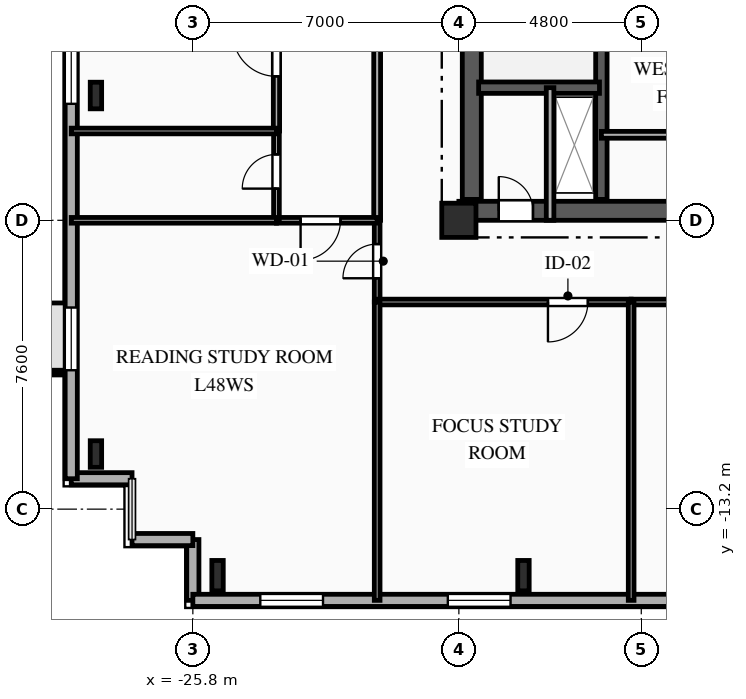
"""IFC4 building model, lengths in metres.
Left out: names, types, materials, properties, quantities, classifications, styles, units other than length and angle.
Written with IfcOpenShell. Run it as: python <this file> out.ifc"""

import sys

from ifc_helpers import new_model, si_unit, direction, frame, frame_2d, origin, origin_2d, place, context, subcontext, project, spatial, rectangle, i_section, extrude, element, fill, save


model = new_model("IFC4")
c1 = context("Model", 3, precision=1e-05, world=origin(), true_north=direction((0.0, 1.0)))
c2 = subcontext(c1, "Body", "Model", "MODEL_VIEW")
j1 = project(units=[si_unit("LENGTHUNIT", "METRE"), si_unit("PLANEANGLEUNIT", "RADIAN")], contexts=[c1])
p1 = place(None, origin())
s1 = spatial("IfcSite", under=j1, at=p1, CompositionType="ELEMENT")
p2 = place(p1, origin())
s2 = spatial("IfcBuilding", under=s1, at=p2, CompositionType="ELEMENT")
p3 = place(p2, frame((0.0, 0.0, 171.2)))
s3 = spatial("IfcBuildingStorey", under=s2, at=p3, CompositionType="ELEMENT", Elevation=171.2)
p4 = place(p3, frame((-18.8, -5.6, 0.0), z_axis=(0.0, 0.0, 1.0), x_axis=(1.0, 0.0, 0.0)))
e1 = element("IfcColumn", 1, at=p4, inside=s3, PredefinedType="COLUMN", context=c2, shape_type="SweptSolid", body=[
    extrude(rectangle(XDim=0.9, YDim=0.9, at=origin_2d()), origin(), (0.0, 0.0, 1.0), 3.35),
])
for number, where, z_axis, x_axis in (
    (2, (-25.15, -14.95, 0.0), (0.0, 0.0, 1.0), (1.0, 0.0, 0.0)),
    (3, (-17.1, -14.95, 0.0), (0.0, 0.0, 1.0), (1.0, 0.0, 0.0)),
):
    element("IfcColumn", number, at=place(p3, frame(where, z_axis=z_axis, x_axis=x_axis)), inside=s3, PredefinedType="COLUMN", context=c2, shape_type="SweptSolid", body=[
        extrude(i_section(OverallWidth=0.3, OverallDepth=0.8, WebThickness=0.018, FlangeThickness=0.033, FilletRadius=0.03, at=origin_2d()), origin(), (0.0, 0.0, 1.0), 3.35),
    ])
for number, where, z_axis, x_axis in (
    (4, (-28.35, -2.317, 0.0), (0.0, 0.0, 1.0), (1.0, 0.0, 0.0)),
    (5, (-28.35, -11.75, 0.0), (0.0, 0.0, 1.0), (1.0, 0.0, 0.0)),
):
    element("IfcColumn", number, at=place(p3, frame(where, z_axis=z_axis, x_axis=x_axis)), inside=s3, PredefinedType="COLUMN", context=c2, shape_type="SweptSolid", body=[
        extrude(i_section(OverallWidth=0.3, OverallDepth=0.7, WebThickness=0.017, FlangeThickness=0.032, FilletRadius=0.027, at=origin_2d()), origin(), (0.0, 0.0, 1.0), 3.35),
    ])
p5 = place(p3, frame((-25.8, -15.6, 0.0), z_axis=(0.0, 0.0, 1.0), x_axis=(0.0, 1.0, 0.0)))
e6 = element("IfcWall", 6, at=p5, inside=s3, PredefinedType="SOLIDWALL", context=c2, shape_type="SweptSolid", body=[
    extrude(rectangle(XDim=1.6, YDim=0.32, at=frame_2d((0.8, 0.0))), origin(), (0.0, 0.0, 1.0), 3.0),
])
p6 = place(p3, frame((-25.8, -14.0, 0.0), z_axis=(0.0, 0.0, 1.0), x_axis=(-1.0, 0.0, 0.0)))
e7 = element("IfcWall", 7, at=p6, inside=s3, PredefinedType="SOLIDWALL", context=c2, shape_type="SweptSolid", body=[
    extrude(rectangle(XDim=1.6, YDim=0.32, at=frame_2d((0.8, 0.0))), origin(), (0.0, 0.0, 1.0), 3.0),
])
p7 = place(p3, frame((-27.4, -12.4, 0.0), z_axis=(0.0, 0.0, 1.0), x_axis=(-1.0, 0.0, 0.0)))
e8 = element("IfcWall", 8, at=p7, inside=s3, PredefinedType="SOLIDWALL", context=c2, shape_type="SweptSolid", body=[
    extrude(rectangle(XDim=1.6, YDim=0.32, at=frame_2d((0.8, 0.0))), origin(), (0.0, 0.0, 1.0), 3.0),
])
p8 = place(p3, frame((-29.0, -12.4, 0.0), z_axis=(0.0, 0.0, 1.0), x_axis=(0.0, 1.0, 0.0)))
e9 = element("IfcWall", 9, at=p8, inside=s3, PredefinedType="SOLIDWALL", context=c2, shape_type="SweptSolid", body=[
    extrude(rectangle(XDim=29.6, YDim=0.32, at=frame_2d((14.8, 0.0))), origin(), (0.0, 0.0, 1.0), 3.0),
])
p9 = place(p8, frame((2.855, 0.0, 0.85)))
e10 = element("IfcOpeningElement", 10, at=p9, cuts=e9, PredefinedType="OPENING", context=c2, shape_type="SweptSolid", body=[
    extrude(rectangle(XDim=1.65, YDim=1.85, at=frame_2d((0.825, 0.925))), frame((0.0, 0.17, 0.0), z_axis=(0.0, -1.0, 0.0), x_axis=(1.0, 0.0, 0.0)), (0.0, 0.0, 1.0), 0.34),
])
p10 = place(p8, frame((9.865, 0.0, 0.85)))
e11 = element("IfcOpeningElement", 11, at=p10, cuts=e9, PredefinedType="OPENING", context=c2, shape_type="SweptSolid", body=[
    extrude(rectangle(XDim=1.95, YDim=1.85, at=frame_2d((0.975, 0.925))), frame((0.0, 0.17, 0.0), z_axis=(0.0, -1.0, 0.0), x_axis=(1.0, 0.0, 0.0)), (0.0, 0.0, 1.0), 0.34),
])
p11 = place(p8, frame((13.13, 0.0, 0.85)))
e12 = element("IfcOpeningElement", 12, at=p11, cuts=e9, PredefinedType="OPENING", context=c2, shape_type="SweptSolid", body=[
    extrude(rectangle(XDim=1.5, YDim=1.85, at=frame_2d((0.75, 0.925))), frame((0.0, 0.17, 0.0), z_axis=(0.0, -1.0, 0.0), x_axis=(1.0, 0.0, 0.0)), (0.0, 0.0, 1.0), 0.34),
])
p12 = place(p8, frame((15.93, 0.0, 0.85)))
e13 = element("IfcOpeningElement", 13, at=p12, cuts=e9, PredefinedType="OPENING", context=c2, shape_type="SweptSolid", body=[
    extrude(rectangle(XDim=1.5, YDim=1.85, at=frame_2d((0.75, 0.925))), frame((0.0, 0.17, 0.0), z_axis=(0.0, -1.0, 0.0), x_axis=(1.0, 0.0, 0.0)), (0.0, 0.0, 1.0), 0.34),
])
p13 = place(p8, frame((18.77, 0.0, 0.85)))
e14 = element("IfcOpeningElement", 14, at=p13, cuts=e9, PredefinedType="OPENING", context=c2, shape_type="SweptSolid", body=[
    extrude(rectangle(XDim=1.5, YDim=1.85, at=frame_2d((0.75, 0.925))), frame((0.0, 0.17, 0.0), z_axis=(0.0, -1.0, 0.0), x_axis=(1.0, 0.0, 0.0)), (0.0, 0.0, 1.0), 0.34),
])
p14 = place(p8, frame((24.255, 0.0, 0.85)))
e15 = element("IfcOpeningElement", 15, at=p14, cuts=e9, PredefinedType="OPENING", context=c2, shape_type="SweptSolid", body=[
    extrude(rectangle(XDim=1.65, YDim=1.85, at=frame_2d((0.825, 0.925))), frame((0.0, 0.17, 0.0), z_axis=(0.0, -1.0, 0.0), x_axis=(1.0, 0.0, 0.0)), (0.0, 0.0, 1.0), 0.34),
])
p15 = place(p3, frame((23.8, -15.6, 0.0), z_axis=(0.0, 0.0, 1.0), x_axis=(-1.0, 0.0, 0.0)))
e16 = element("IfcWall", 16, at=p15, inside=s3, PredefinedType="SOLIDWALL", context=c2, shape_type="SweptSolid", body=[
    extrude(rectangle(XDim=49.6, YDim=0.32, at=frame_2d((24.8, 0.0))), origin(), (0.0, 0.0, 1.0), 3.0),
])
p16 = place(p15, frame((1.13, 0.0, 0.85)))
e17 = element("IfcOpeningElement", 17, at=p16, cuts=e16, PredefinedType="OPENING", context=c2, shape_type="SweptSolid", body=[
    extrude(rectangle(XDim=1.1, YDim=1.85, at=frame_2d((0.55, 0.925))), frame((0.0, 0.17, 0.0), z_axis=(0.0, -1.0, 0.0), x_axis=(1.0, 0.0, 0.0)), (0.0, 0.0, 1.0), 0.34),
])
p17 = place(p15, frame((5.695, 0.0, 0.85)))
e18 = element("IfcOpeningElement", 18, at=p17, cuts=e16, PredefinedType="OPENING", context=c2, shape_type="SweptSolid", body=[
    extrude(rectangle(XDim=1.65, YDim=1.85, at=frame_2d((0.825, 0.925))), frame((0.0, 0.17, 0.0), z_axis=(0.0, -1.0, 0.0), x_axis=(1.0, 0.0, 0.0)), (0.0, 0.0, 1.0), 0.34),
])
p18 = place(p15, frame((12.975, 0.0, 0.85)))
e19 = element("IfcOpeningElement", 19, at=p18, cuts=e16, PredefinedType="OPENING", context=c2, shape_type="SweptSolid", body=[
    extrude(rectangle(XDim=1.65, YDim=1.85, at=frame_2d((0.825, 0.925))), frame((0.0, 0.17, 0.0), z_axis=(0.0, -1.0, 0.0), x_axis=(1.0, 0.0, 0.0)), (0.0, 0.0, 1.0), 0.34),
])
p19 = place(p15, frame((21.636, 0.0, 0.85)))
e20 = element("IfcOpeningElement", 20, at=p19, cuts=e16, PredefinedType="OPENING", context=c2, shape_type="SweptSolid", body=[
    extrude(rectangle(XDim=2.2, YDim=1.85, at=frame_2d((1.1, 0.925))), frame((0.0, 0.17, 0.0), z_axis=(0.0, -1.0, 0.0), x_axis=(1.0, 0.0, 0.0)), (0.0, 0.0, 1.0), 0.34),
])
p20 = place(p15, frame((33.935, 0.0, 0.85)))
e21 = element("IfcOpeningElement", 21, at=p20, cuts=e16, PredefinedType="OPENING", context=c2, shape_type="SweptSolid", body=[
    extrude(rectangle(XDim=1.65, YDim=1.85, at=frame_2d((0.825, 0.925))), frame((0.0, 0.17, 0.0), z_axis=(0.0, -1.0, 0.0), x_axis=(1.0, 0.0, 0.0)), (0.0, 0.0, 1.0), 0.34),
])
p21 = place(p15, frame((41.24, 0.0, 0.85)))
e22 = element("IfcOpeningElement", 22, at=p21, cuts=e16, PredefinedType="OPENING", context=c2, shape_type="SweptSolid", body=[
    extrude(rectangle(XDim=1.65, YDim=1.85, at=frame_2d((0.825, 0.925))), frame((0.0, 0.17, 0.0), z_axis=(0.0, -1.0, 0.0), x_axis=(1.0, 0.0, 0.0)), (0.0, 0.0, 1.0), 0.34),
])
p22 = place(p15, frame((46.175, 0.0, 0.85)))
e23 = element("IfcOpeningElement", 23, at=p22, cuts=e16, PredefinedType="OPENING", context=c2, shape_type="SweptSolid", body=[
    extrude(rectangle(XDim=1.65, YDim=1.85, at=frame_2d((0.825, 0.925))), frame((0.0, 0.17, 0.0), z_axis=(0.0, -1.0, 0.0), x_axis=(1.0, 0.0, 0.0)), (0.0, 0.0, 1.0), 0.34),
])
p23 = place(p3, frame((-18.8, -5.35, 0.0), z_axis=(0.0, 0.0, 1.0), x_axis=(1.0, 0.0, 0.0)))
e24 = element("IfcWall", 24, at=p23, inside=s3, PredefinedType="SHEAR", context=c2, shape_type="SweptSolid", body=[
    extrude(rectangle(XDim=9.6, YDim=0.5, at=frame_2d((4.8, 0.0))), origin(), (0.0, 0.0, 1.0), 3.0),
])
p24 = place(p23, frame((1.05, 0.0, 0.0)))
e25 = element("IfcOpeningElement", 25, at=p24, cuts=e24, PredefinedType="OPENING", context=c2, shape_type="SweptSolid", body=[
    extrude(rectangle(XDim=0.9, YDim=2.1, at=frame_2d((0.45, 1.05))), frame((0.0, 0.26, 0.0), z_axis=(0.0, -1.0, 0.0), x_axis=(1.0, 0.0, 0.0)), (0.0, 0.0, 1.0), 0.52),
])
p25 = place(p3, frame((-18.46, -5.05, 0.0), z_axis=(0.0, 0.0, 1.0), x_axis=(0.0, 1.0, 0.0)))
e26 = element("IfcWall", 26, at=p25, inside=s3, PredefinedType="SHEAR", context=c2, shape_type="SweptSolid", body=[
    extrude(rectangle(XDim=10.1, YDim=0.5, at=frame_2d((5.05, 0.0))), origin(), (0.0, 0.0, 1.0), 3.0),
])
p26 = place(p3, frame((-15.05, -5.05, 0.0), z_axis=(0.0, 0.0, 1.0), x_axis=(0.0, 1.0, 0.0)))
e27 = element("IfcWall", 27, at=p26, inside=s3, PredefinedType="SHEAR", context=c2, shape_type="SweptSolid", body=[
    extrude(rectangle(XDim=10.1, YDim=0.3, at=frame_2d((5.05, 0.0))), origin(), (0.0, 0.0, 1.0), 3.0),
])
p27 = place(p3, frame((-18.28, -2.11, 0.0), z_axis=(0.0, 0.0, 1.0), x_axis=(1.0, 0.0, 0.0)))
e28 = element("IfcWall", 28, at=p27, inside=s3, PredefinedType="SHEAR", context=c2, shape_type="SweptSolid", body=[
    extrude(rectangle(XDim=3.18, YDim=0.3, at=frame_2d((1.59, 0.0))), origin(), (0.0, 0.0, 1.0), 3.0),
])
p28 = place(p3, frame((-16.4, -5.6, 0.0), z_axis=(0.0, 0.0, 1.0), x_axis=(0.0, 1.0, 0.0)))
e29 = element("IfcWall", 29, at=p28, inside=s3, PredefinedType="PARTITIONING", context=c2, shape_type="SweptSolid", body=[
    extrude(rectangle(XDim=3.49, YDim=0.2, at=frame_2d((1.745, 0.0))), origin(), (0.0, 0.0, 1.0), 3.0),
])
p29 = place(p3, frame((-15.05, -3.35, 0.0), z_axis=(0.0, 0.0, 1.0), x_axis=(1.0, 0.0, 0.0)))
e30 = element("IfcWall", 30, at=p29, inside=s3, PredefinedType="PARTITIONING", context=c2, shape_type="SweptSolid", body=[
    extrude(rectangle(XDim=5.85, YDim=0.18, at=frame_2d((2.925, 0.0))), origin(), (0.0, 0.0, 1.0), 2.715),
])
p30 = place(p3, frame((-20.95, -7.75, 0.0), z_axis=(0.0, 0.0, 1.0), x_axis=(0.0, 1.0, 0.0)))
e31 = element("IfcWall", 31, at=p30, inside=s3, PredefinedType="PARTITIONING", context=c2, shape_type="SweptSolid", body=[
    extrude(rectangle(XDim=2.15, YDim=0.15, at=frame_2d((1.075, 0.0))), origin(), (0.0, 0.0, 1.0), 3.0),
])
p31 = place(p30, frame((0.625, 0.0, 0.0)))
e32 = element("IfcOpeningElement", 32, at=p31, cuts=e31, PredefinedType="OPENING", context=c2, shape_type="SweptSolid", body=[
    extrude(rectangle(XDim=0.9, YDim=2.1, at=frame_2d((0.45, 1.05))), frame((0.0, 0.085, 0.0), z_axis=(0.0, -1.0, 0.0), x_axis=(1.0, 0.0, 0.0)), (0.0, 0.0, 1.0), 0.17),
])
p32 = place(p3, frame((-14.267, -7.75, 0.0), z_axis=(0.0, 0.0, 1.0), x_axis=(-1.0, 0.0, 0.0)))
e33 = element("IfcWall", 33, at=p32, inside=s3, PredefinedType="PARTITIONING", context=c2, shape_type="SweptSolid", body=[
    extrude(rectangle(XDim=6.683, YDim=0.15, at=frame_2d((3.342, 0.0))), origin(), (0.0, 0.0, 1.0), 3.0),
])
p33 = place(p32, frame((1.139, 0.0, 0.0)))
e34 = element("IfcOpeningElement", 34, at=p33, cuts=e33, PredefinedType="OPENING", context=c2, shape_type="SweptSolid", body=[
    extrude(rectangle(XDim=1.05, YDim=2.15, at=frame_2d((0.525, 1.075))), frame((0.0, 0.085, 0.0), z_axis=(0.0, -1.0, 0.0), x_axis=(1.0, 0.0, 0.0)), (0.0, 0.0, 1.0), 0.17),
])
p34 = place(p3, frame((-7.583, -7.75, 0.0), z_axis=(0.0, 0.0, 1.0), x_axis=(-1.0, 0.0, 0.0)))
e35 = element("IfcWall", 35, at=p34, inside=s3, PredefinedType="PARTITIONING", context=c2, shape_type="SweptSolid", body=[
    extrude(rectangle(XDim=6.684, YDim=0.15, at=frame_2d((3.342, 0.0))), origin(), (0.0, 0.0, 1.0), 3.0),
])
p35 = place(p34, frame((4.494, 0.0, 0.0)))
e36 = element("IfcOpeningElement", 36, at=p35, cuts=e35, PredefinedType="OPENING", context=c2, shape_type="SweptSolid", body=[
    extrude(rectangle(XDim=1.05, YDim=2.15, at=frame_2d((0.525, 1.075))), frame((0.0, 0.085, 0.0), z_axis=(0.0, -1.0, 0.0), x_axis=(1.0, 0.0, 0.0)), (0.0, 0.0, 1.0), 0.17),
])
p36 = place(p3, frame((-20.95, -5.6, 0.0), z_axis=(0.0, 0.0, 1.0), x_axis=(0.0, 1.0, 0.0)))
e37 = element("IfcWall", 37, at=p36, inside=s3, PredefinedType="PARTITIONING", context=c2, shape_type="SweptSolid", body=[
    extrude(rectangle(XDim=14.1, YDim=0.18, at=frame_2d((7.05, 0.0))), origin(), (0.0, 0.0, 1.0), 3.0),
])
p37 = place(p36, frame((5.058, 0.0, 0.0)))
e38 = element("IfcOpeningElement", 38, at=p37, cuts=e37, PredefinedType="OPENING", context=c2, shape_type="SweptSolid", body=[
    extrude(rectangle(XDim=1.0, YDim=2.15, at=frame_2d((0.5, 1.075))), frame((0.0, 0.1, 0.0), z_axis=(0.0, -1.0, 0.0), x_axis=(1.0, 0.0, 0.0)), (0.0, 0.0, 1.0), 0.2),
])
p38 = place(p3, frame((-20.95, -5.6, 0.0), z_axis=(0.0, 0.0, 1.0), x_axis=(-1.0, 0.0, 0.0)))
e39 = element("IfcWall", 39, at=p38, inside=s3, PredefinedType="PARTITIONING", context=c2, shape_type="SweptSolid", body=[
    extrude(rectangle(XDim=2.65, YDim=0.15, at=frame_2d((1.325, 0.0))), origin(), (0.0, 0.0, 1.0), 3.0),
])
p39 = place(p38, frame((0.965, 0.0, 0.0)))
e40 = element("IfcOpeningElement", 40, at=p39, cuts=e39, PredefinedType="OPENING", context=c2, shape_type="SweptSolid", body=[
    extrude(rectangle(XDim=1.05, YDim=2.15, at=frame_2d((0.525, 1.075))), frame((0.0, 0.085, 0.0), z_axis=(0.0, -1.0, 0.0), x_axis=(1.0, 0.0, 0.0)), (0.0, 0.0, 1.0), 0.17),
])
p40 = place(p3, frame((-23.6, -5.6, 0.0), z_axis=(0.0, 0.0, 1.0), x_axis=(0.0, 1.0, 0.0)))
e41 = element("IfcWall", 41, at=p40, inside=s3, PredefinedType="PLUMBINGWALL", context=c2, shape_type="SweptSolid", body=[
    extrude(rectangle(XDim=2.35, YDim=0.15, at=frame_2d((1.175, 0.0))), origin(), (0.0, 0.0, 1.0), 2.655),
])
p41 = place(p40, frame((0.834, 0.0, 0.0)))
e42 = element("IfcOpeningElement", 42, at=p41, cuts=e41, PredefinedType="OPENING", context=c2, shape_type="SweptSolid", body=[
    extrude(rectangle(XDim=0.9, YDim=2.1, at=frame_2d((0.45, 1.05))), frame((0.0, 0.085, 0.0), z_axis=(0.0, -1.0, 0.0), x_axis=(1.0, 0.0, 0.0)), (0.0, 0.0, 1.0), 0.17),
])
p42 = place(p3, frame((-23.6, -3.25, 0.0), z_axis=(0.0, 0.0, 1.0), x_axis=(0.0, 1.0, 0.0)))
e43 = element("IfcWall", 43, at=p42, inside=s3, PredefinedType="PARTITIONING", context=c2, shape_type="SweptSolid", body=[
    extrude(rectangle(XDim=3.29, YDim=0.165, at=frame_2d((1.645, 0.0))), origin(), (0.0, 0.0, 1.0), 2.655),
])
p43 = place(p42, frame((1.438, 0.0, 0.0)))
e44 = element("IfcOpeningElement", 44, at=p43, cuts=e43, PredefinedType="OPENING", context=c2, shape_type="SweptSolid", body=[
    extrude(rectangle(XDim=1.15, YDim=2.15, at=frame_2d((0.575, 1.075))), frame((0.0, 0.093, 0.0), z_axis=(0.0, -1.0, 0.0), x_axis=(1.0, 0.0, 0.0)), (0.0, 0.0, 1.0), 0.185),
])
p44 = place(p3, frame((-29.0, -5.6, 0.0), z_axis=(0.0, 0.0, 1.0), x_axis=(1.0, 0.0, 0.0)))
e45 = element("IfcWall", 45, at=p44, inside=s3, PredefinedType="PLUMBINGWALL", context=c2, shape_type="SweptSolid", body=[
    extrude(rectangle(XDim=5.4, YDim=0.15, at=frame_2d((2.7, 0.0))), origin(), (0.0, 0.0, 1.0), 3.0),
])
p45 = place(p3, frame((-20.95, -7.75, 0.0), z_axis=(0.0, 0.0, 1.0), x_axis=(0.0, -1.0, 0.0)))
e46 = element("IfcWall", 46, at=p45, inside=s3, PredefinedType="PARTITIONING", context=c2, shape_type="SweptSolid", body=[
    extrude(rectangle(XDim=7.85, YDim=0.15, at=frame_2d((3.925, 0.0))), origin(), (0.0, 0.0, 1.0), 3.0),
])
p46 = place(p3, frame((-29.0, -3.25, 0.0), z_axis=(0.0, 0.0, 1.0), x_axis=(1.0, 0.0, 0.0)))
e47 = element("IfcWall", 47, at=p46, inside=s3, PredefinedType="PLUMBINGWALL", context=c2, shape_type="SweptSolid", body=[
    extrude(rectangle(XDim=5.4, YDim=0.15, at=frame_2d((2.7, 0.0))), origin(), (0.0, 0.0, 1.0), 3.0),
])
p47 = place(p3, frame((-14.267, -7.75, 0.0), z_axis=(0.0, 0.0, 1.0), x_axis=(0.0, -1.0, 0.0)))
e48 = element("IfcWall", 48, at=p47, inside=s3, PredefinedType="PARTITIONING", context=c2, shape_type="SweptSolid", body=[
    extrude(rectangle(XDim=7.85, YDim=0.15, at=frame_2d((3.925, 0.0))), origin(), (0.0, 0.0, 1.0), 3.0),
])
p48 = place(p9, origin())
e49 = element("IfcWindow", 49, at=p48, inside=s3, PartitioningType="SINGLE_PANEL", PredefinedType="WINDOW", context=c2, shape_type="SweptSolid", body=[
    extrude(rectangle(XDim=1.65, YDim=1.85, at=frame_2d((0.825, 0.925))), frame((0.0, 0.03, 0.0), z_axis=(0.0, -1.0, 0.0), x_axis=(1.0, 0.0, 0.0)), (0.0, 0.0, 1.0), 0.06),
])
fill(e10, e49)
p49 = place(p10, origin())
e50 = element("IfcWindow", 50, at=p49, inside=s3, PartitioningType="SINGLE_PANEL", PredefinedType="WINDOW", context=c2, shape_type="SweptSolid", body=[
    extrude(rectangle(XDim=1.95, YDim=1.85, at=frame_2d((0.975, 0.925))), frame((0.0, 0.03, 0.0), z_axis=(0.0, -1.0, 0.0), x_axis=(1.0, 0.0, 0.0)), (0.0, 0.0, 1.0), 0.06),
])
fill(e11, e50)
p50 = place(p21, origin())
e51 = element("IfcWindow", 51, at=p50, inside=s3, PartitioningType="SINGLE_PANEL", PredefinedType="WINDOW", context=c2, shape_type="SweptSolid", body=[
    extrude(rectangle(XDim=1.65, YDim=1.85, at=frame_2d((0.825, 0.925))), frame((0.0, 0.03, 0.0), z_axis=(0.0, -1.0, 0.0), x_axis=(1.0, 0.0, 0.0)), (0.0, 0.0, 1.0), 0.06),
])
fill(e22, e51)
p51 = place(p22, origin())
e52 = element("IfcWindow", 52, at=p51, inside=s3, PartitioningType="SINGLE_PANEL", PredefinedType="WINDOW", context=c2, shape_type="SweptSolid", body=[
    extrude(rectangle(XDim=1.65, YDim=1.85, at=frame_2d((0.825, 0.925))), frame((0.0, 0.03, 0.0), z_axis=(0.0, -1.0, 0.0), x_axis=(1.0, 0.0, 0.0)), (0.0, 0.0, 1.0), 0.06),
])
fill(e23, e52)
p52 = place(p24, origin())
e53 = element("IfcDoor", 53, at=p52, inside=s3, OperationType="SINGLE_SWING_LEFT", PredefinedType="DOOR", context=c2, shape_type="SweptSolid", body=[
    extrude(rectangle(XDim=0.9, YDim=2.1, at=frame_2d((0.45, 1.05))), frame((0.0, 0.025, 0.0), z_axis=(0.0, -1.0, 0.0), x_axis=(1.0, 0.0, 0.0)), (0.0, 0.0, 1.0), 0.05),
])
fill(e25, e53)
p53 = place(p31, origin())
e54 = element("IfcDoor", 54, at=p53, inside=s3, OperationType="SINGLE_SWING_LEFT", PredefinedType="DOOR", context=c2, shape_type="SweptSolid", body=[
    extrude(rectangle(XDim=0.9, YDim=2.1, at=frame_2d((0.45, 1.05))), frame((0.0, 0.025, 0.0), z_axis=(0.0, -1.0, 0.0), x_axis=(1.0, 0.0, 0.0)), (0.0, 0.0, 1.0), 0.05),
])
fill(e32, e54)
p54 = place(p33, origin())
e55 = element("IfcDoor", 55, at=p54, inside=s3, OperationType="SINGLE_SWING_RIGHT", PredefinedType="DOOR", context=c2, shape_type="SweptSolid", body=[
    extrude(rectangle(XDim=1.05, YDim=2.15, at=frame_2d((0.525, 1.075))), frame((0.0, 0.025, 0.0), z_axis=(0.0, -1.0, 0.0), x_axis=(1.0, 0.0, 0.0)), (0.0, 0.0, 1.0), 0.05),
])
fill(e34, e55)
p55 = place(p39, origin())
e56 = element("IfcDoor", 56, at=p55, inside=s3, OperationType="SINGLE_SWING_RIGHT", PredefinedType="DOOR", context=c2, shape_type="SweptSolid", body=[
    extrude(rectangle(XDim=1.05, YDim=2.15, at=frame_2d((0.525, 1.075))), frame((0.0, 0.025, 0.0), z_axis=(0.0, -1.0, 0.0), x_axis=(1.0, 0.0, 0.0)), (0.0, 0.0, 1.0), 0.05),
])
fill(e40, e56)
p56 = place(p41, origin())
e57 = element("IfcDoor", 57, at=p56, inside=s3, OperationType="SINGLE_SWING_LEFT", PredefinedType="DOOR", context=c2, shape_type="SweptSolid", body=[
    extrude(rectangle(XDim=0.9, YDim=2.1, at=frame_2d((0.45, 1.05))), frame((0.0, 0.025, 0.0), z_axis=(0.0, -1.0, 0.0), x_axis=(1.0, 0.0, 0.0)), (0.0, 0.0, 1.0), 0.05),
])
fill(e42, e57)
p57 = place(p43, origin())
e58 = element("IfcDoor", 58, at=p57, inside=s3, OperationType="SINGLE_SWING_RIGHT", PredefinedType="DOOR", context=c2, shape_type="SweptSolid", body=[
    extrude(rectangle(XDim=1.15, YDim=2.15, at=frame_2d((0.575, 1.075))), frame((0.0, 0.025, 0.0), z_axis=(0.0, -1.0, 0.0), x_axis=(1.0, 0.0, 0.0)), (0.0, 0.0, 1.0), 0.05),
])
fill(e44, e58)
save(model, sys.argv[1])
